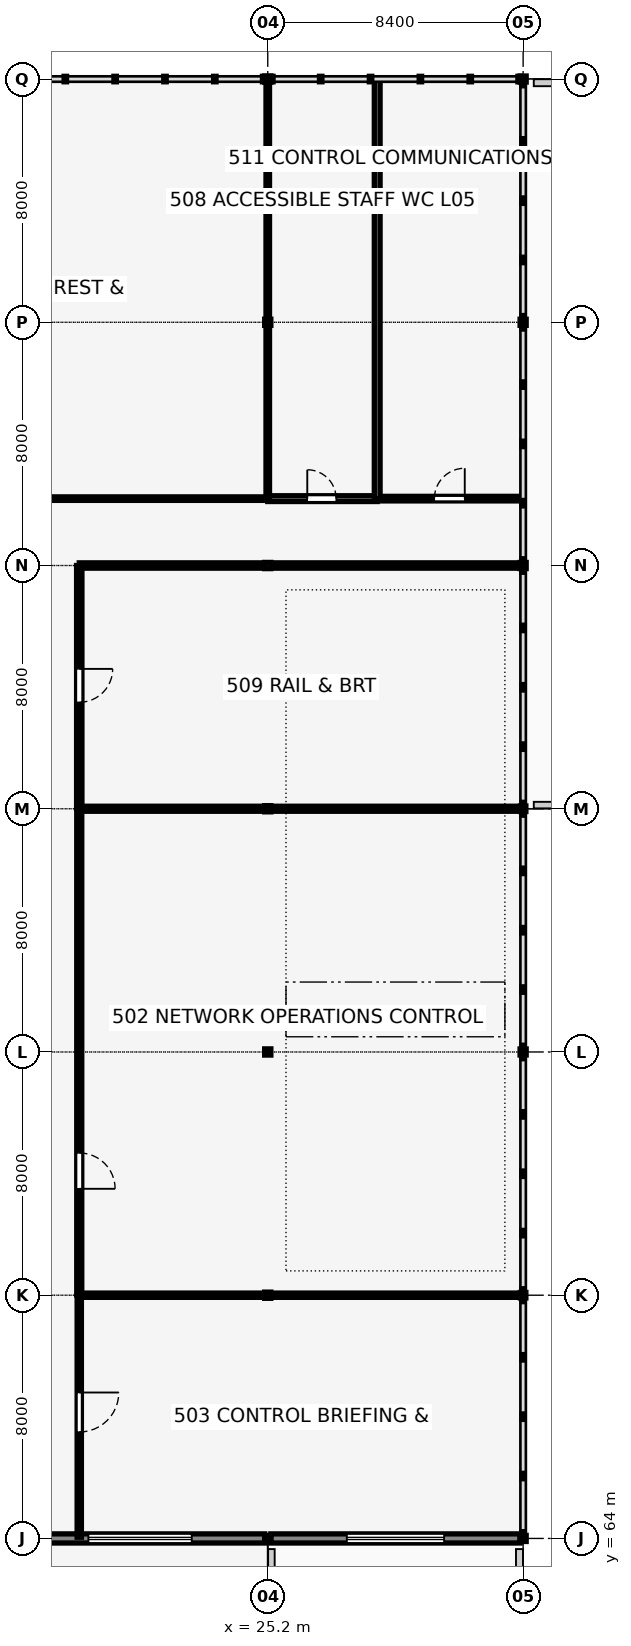
"""IFC4 building model, lengths in metres.
Left out: names, types, materials, properties, quantities, classifications, styles, units other than length and angle.
Written with IfcOpenShell. Run it as: python <this file> out.ifc"""

import sys

from ifc_helpers import new_model, si_unit, direction, frame, frame_2d, origin, origin_2d, place, context, subcontext, project, spatial, rectangle, hollow_rectangle, i_section, extrude, element, fill, save


model = new_model("IFC4")
c1 = context("Model", 3, precision=1e-05, world=origin(), true_north=direction((0.0, 1.0)))
c2 = subcontext(c1, "Body", "Model", "MODEL_VIEW")
j1 = project(units=[si_unit("LENGTHUNIT", "METRE"), si_unit("PLANEANGLEUNIT", "RADIAN")], contexts=[c1])
p1 = place(None, origin())
s1 = spatial("IfcSite", under=j1, at=p1, CompositionType="ELEMENT")
p2 = place(p1, origin())
s2 = spatial("IfcBuilding", under=s1, at=p2, CompositionType="ELEMENT")
p3 = place(p2, frame((0.0, 0.0, 21.04)))
s3 = spatial("IfcBuildingStorey", under=s2, at=p3, CompositionType="ELEMENT", Elevation=21.04)
for number, where, z_axis, x_axis in (
    (1, (25.2, 64.0, 0.0), (0.0, 0.0, 1.0), (1.0, 0.0, 0.0)),
    (2, (25.2, 72.0, 0.0), (0.0, 0.0, 1.0), (1.0, 0.0, 0.0)),
    (3, (25.2, 80.0, 0.0), (0.0, 0.0, 1.0), (1.0, 0.0, 0.0)),
    (4, (25.2, 88.0, 0.0), (0.0, 0.0, 1.0), (1.0, 0.0, 0.0)),
    (5, (25.2, 96.0, 0.0), (0.0, 0.0, 1.0), (1.0, 0.0, 0.0)),
    (6, (25.2, 104.0, 0.0), (0.0, 0.0, 1.0), (1.0, 0.0, 0.0)),
    (7, (25.2, 112.0, 0.0), (0.0, 0.0, 1.0), (1.0, 0.0, 0.0)),
):
    element("IfcColumn", number, at=place(p3, frame(where, z_axis=z_axis, x_axis=x_axis)), inside=s3, PredefinedType="COLUMN", context=c2, shape_type="SweptSolid", body=[
        extrude(i_section(OverallWidth=0.204, OverallDepth=0.203, WebThickness=0.007, FlangeThickness=0.011, FilletRadius=0.01, at=origin_2d()), origin(), (0.0, 0.0, 1.0), 4.82),
    ])
p4 = place(p3, frame((33.6, 64.0, 0.0), z_axis=(0.0, 0.0, 1.0), x_axis=(1.0, 0.0, 0.0)))
e8 = element("IfcColumn", 8, at=p4, inside=s3, PredefinedType="COLUMN", context=c2, shape_type="SweptSolid", body=[
    extrude(hollow_rectangle(XDim=0.2, YDim=0.2, WallThickness=0.01, InnerFilletRadius=0.015, OuterFilletRadius=0.025, at=origin_2d()), origin(), (0.0, 0.0, 1.0), 3.92),
])
p5 = place(p3, frame((33.6, 72.0, 0.0), z_axis=(0.0, 0.0, 1.0), x_axis=(1.0, 0.0, 0.0)))
e9 = element("IfcColumn", 9, at=p5, inside=s3, PredefinedType="COLUMN", context=c2, shape_type="SweptSolid", body=[
    extrude(hollow_rectangle(XDim=0.18, YDim=0.18, WallThickness=0.008, InnerFilletRadius=0.012, OuterFilletRadius=0.02, at=origin_2d()), origin(), (0.0, 0.0, 1.0), 3.92),
])
p6 = place(p3, frame((33.6, 80.0, 0.0), z_axis=(0.0, 0.0, 1.0), x_axis=(1.0, 0.0, 0.0)))
e10 = element("IfcColumn", 10, at=p6, inside=s3, PredefinedType="COLUMN", context=c2, shape_type="SweptSolid", body=[
    extrude(hollow_rectangle(XDim=0.2, YDim=0.2, WallThickness=0.01, InnerFilletRadius=0.015, OuterFilletRadius=0.025, at=origin_2d()), origin(), (0.0, 0.0, 1.0), 3.92),
])
p7 = place(p3, frame((33.6, 88.0, 0.0), z_axis=(0.0, 0.0, 1.0), x_axis=(1.0, 0.0, 0.0)))
e11 = element("IfcColumn", 11, at=p7, inside=s3, PredefinedType="COLUMN", context=c2, shape_type="SweptSolid", body=[
    extrude(hollow_rectangle(XDim=0.18, YDim=0.18, WallThickness=0.008, InnerFilletRadius=0.012, OuterFilletRadius=0.02, at=origin_2d()), origin(), (0.0, 0.0, 1.0), 3.92),
])
for number, where, z_axis, x_axis in (
    (12, (33.6, 96.0, 0.0), (0.0, 0.0, 1.0), (1.0, 0.0, 0.0)),
    (13, (33.6, 104.0, 0.0), (0.0, 0.0, 1.0), (1.0, 0.0, 0.0)),
    (14, (33.6, 112.0, 0.0), (0.0, 0.0, 1.0), (1.0, 0.0, 0.0)),
):
    element("IfcColumn", number, at=place(p3, frame(where, z_axis=z_axis, x_axis=x_axis)), inside=s3, PredefinedType="COLUMN", context=c2, shape_type="SweptSolid", body=[
        extrude(hollow_rectangle(XDim=0.2, YDim=0.2, WallThickness=0.01, InnerFilletRadius=0.015, OuterFilletRadius=0.025, at=origin_2d()), origin(), (0.0, 0.0, 1.0), 3.92),
    ])
p8 = place(p3, frame((16.902, 64.0, 0.0), z_axis=(0.0, 0.0, 1.0), x_axis=(1.0, 0.0, 0.0)))
e15 = element("IfcWall", 15, at=p8, inside=s3, PredefinedType="SOLIDWALL", context=c2, shape_type="SweptSolid", body=[
    extrude(rectangle(XDim=8.196, YDim=0.3, at=frame_2d((4.098, 0.0))), origin(), (0.0, 0.0, 1.0), 3.92),
])
p9 = place(p8, frame((2.398, 0.0, 0.9), z_axis=(0.0, 0.0, 1.0), x_axis=(1.0, 0.0, 0.0)))
e16 = element("IfcOpeningElement", 16, at=p9, cuts=e15, PredefinedType="OPENING", context=c2, shape_type="SweptSolid", body=[
    extrude(rectangle(XDim=3.4, YDim=1.7, at=frame_2d((1.7, 0.85))), frame((0.0, 0.16, 0.0), z_axis=(0.0, -1.0, 0.0), x_axis=(1.0, 0.0, 0.0)), (0.0, 0.0, 1.0), 0.32),
])
p10 = place(p3, frame((25.302, 64.0, 0.0), z_axis=(0.0, 0.0, 1.0), x_axis=(1.0, 0.0, 0.0)))
e17 = element("IfcWall", 17, at=p10, inside=s3, PredefinedType="SOLIDWALL", context=c2, shape_type="SweptSolid", body=[
    extrude(rectangle(XDim=8.198, YDim=0.3, at=frame_2d((4.099, 0.0))), origin(), (0.0, 0.0, 1.0), 3.92),
])
p11 = place(p10, frame((2.499, 0.0, 0.9), z_axis=(0.0, 0.0, 1.0), x_axis=(1.0, 0.0, 0.0)))
e18 = element("IfcOpeningElement", 18, at=p11, cuts=e17, PredefinedType="OPENING", context=c2, shape_type="SweptSolid", body=[
    extrude(rectangle(XDim=3.2, YDim=1.65, at=frame_2d((1.6, 0.825))), frame((0.0, 0.16, 0.0), z_axis=(0.0, -1.0, 0.0), x_axis=(1.0, 0.0, 0.0)), (0.0, 0.0, 1.0), 0.32),
])
p12 = place(p3, frame((25.32, 56.12, 0.0), z_axis=(0.0, 0.0, 1.0), x_axis=(0.0, 1.0, 0.0)))
e19 = element("IfcWall", 19, at=p12, inside=s3, PredefinedType="PARAPET", context=c2, shape_type="SweptSolid", body=[
    extrude(rectangle(XDim=7.53, YDim=0.215, at=frame_2d((3.765, 0.0))), origin(), (0.0, 0.0, 1.0), 1.05),
])
p13 = place(p3, frame((33.48, 63.65, 0.0), z_axis=(0.0, 0.0, 1.0), x_axis=(0.0, -1.0, 0.0)))
e20 = element("IfcWall", 20, at=p13, inside=s3, PredefinedType="PARAPET", context=c2, shape_type="SweptSolid", body=[
    extrude(rectangle(XDim=7.53, YDim=0.23, at=frame_2d((3.765, 0.0))), origin(), (0.0, 0.0, 1.0), 1.05),
])
p14 = place(p3, frame((50.28, 88.12, 0.0), z_axis=(0.0, 0.0, 1.0), x_axis=(-1.0, 0.0, 0.0)))
e21 = element("IfcWall", 21, at=p14, inside=s3, PredefinedType="PARAPET", context=c2, shape_type="SweptSolid", body=[
    extrude(rectangle(XDim=16.33, YDim=0.215, at=frame_2d((8.165, 0.0))), origin(), (0.0, 0.0, 1.0), 1.05),
])
p15 = place(p3, frame((33.95, 111.88, 0.0), z_axis=(0.0, 0.0, 1.0), x_axis=(1.0, 0.0, 0.0)))
e22 = element("IfcWall", 22, at=p15, inside=s3, PredefinedType="PARAPET", context=c2, shape_type="SweptSolid", body=[
    extrude(rectangle(XDim=16.33, YDim=0.23, at=frame_2d((8.165, 0.0))), origin(), (0.0, 0.0, 1.0), 1.05),
])
p16 = place(p3, frame((19.0, 64.04, 0.0), z_axis=(0.0, 0.0, 1.0), x_axis=(0.0, 1.0, 0.0)))
e23 = element("IfcWall", 23, at=p16, inside=s3, PredefinedType="PARTITIONING", context=c2, shape_type="SweptSolid", body=[
    extrude(rectangle(XDim=7.96, YDim=0.14, at=frame_2d((3.98, 0.0))), origin(), (0.0, 0.0, 1.0), 3.92),
])
p17 = place(p16, frame((4.76, 0.0, 0.0), z_axis=(0.0, 0.0, 1.0), x_axis=(-1.0, 0.0, 0.0)))
e24 = element("IfcOpeningElement", 24, at=p17, cuts=e23, PredefinedType="OPENING", context=c2, shape_type="SweptSolid", body=[
    extrude(rectangle(XDim=1.3, YDim=2.25, at=frame_2d((0.65, 1.125))), frame((0.0, 0.08, 0.0), z_axis=(0.0, -1.0, 0.0), x_axis=(1.0, 0.0, 0.0)), (0.0, 0.0, 1.0), 0.16),
])
p18 = place(p3, frame((19.0, 72.0, 0.0), z_axis=(0.0, 0.0, 1.0), x_axis=(0.0, 1.0, 0.0)))
e25 = element("IfcWall", 25, at=p18, inside=s3, PredefinedType="PARTITIONING", context=c2, shape_type="SweptSolid", body=[
    extrude(rectangle(XDim=16.0, YDim=0.165, at=frame_2d((8.0, 0.0))), origin(), (0.0, 0.0, 1.0), 3.92),
])
p19 = place(p18, frame((4.68, 0.0, 0.0), z_axis=(0.0, 0.0, 1.0), x_axis=(-1.0, 0.0, 0.0)))
e26 = element("IfcOpeningElement", 26, at=p19, cuts=e25, PredefinedType="OPENING", context=c2, shape_type="SweptSolid", body=[
    extrude(rectangle(XDim=1.18, YDim=2.22, at=frame_2d((0.59, 1.11))), frame((0.0, 0.093, 0.0), z_axis=(0.0, -1.0, 0.0), x_axis=(1.0, 0.0, 0.0)), (0.0, 0.0, 1.0), 0.185),
])
p20 = place(p3, frame((19.0, 88.0, 0.0), z_axis=(0.0, 0.0, 1.0), x_axis=(0.0, 1.0, 0.0)))
e27 = element("IfcWall", 27, at=p20, inside=s3, PredefinedType="PARTITIONING", context=c2, shape_type="SweptSolid", body=[
    extrude(rectangle(XDim=8.0, YDim=0.175, at=frame_2d((4.0, 0.0))), origin(), (0.0, 0.0, 1.0), 3.92),
])
p21 = place(p20, frame((4.6, 0.0, 0.0), z_axis=(0.0, 0.0, 1.0), x_axis=(-1.0, 0.0, 0.0)))
e28 = element("IfcOpeningElement", 28, at=p21, cuts=e27, PredefinedType="OPENING", context=c2, shape_type="SweptSolid", body=[
    extrude(rectangle(XDim=1.1, YDim=2.2, at=frame_2d((0.55, 1.1))), frame((0.0, 0.097, 0.0), z_axis=(0.0, -1.0, 0.0), x_axis=(1.0, 0.0, 0.0)), (0.0, 0.0, 1.0), 0.195),
])
p22 = place(p3, frame((8.4, 98.2, 0.0), z_axis=(0.0, 0.0, 1.0), x_axis=(1.0, 0.0, 0.0)))
e29 = element("IfcWall", 29, at=p22, inside=s3, PredefinedType="PARTITIONING", context=c2, shape_type="SweptSolid", body=[
    extrude(rectangle(XDim=16.8, YDim=0.115, at=frame_2d((8.4, 0.0))), origin(), (0.0, 0.0, 1.0), 3.92),
])
p23 = place(p22, frame((3.7, 0.0, 0.0), z_axis=(0.0, 0.0, 1.0), x_axis=(1.0, 0.0, 0.0)))
e30 = element("IfcOpeningElement", 30, at=p23, cuts=e29, PredefinedType="OPENING", context=c2, shape_type="SweptSolid", body=[
    extrude(rectangle(XDim=0.98, YDim=2.15, at=frame_2d((0.49, 1.075))), frame((0.0, 0.067, 0.0), z_axis=(0.0, -1.0, 0.0), x_axis=(1.0, 0.0, 0.0)), (0.0, 0.0, 1.0), 0.135),
])
p24 = place(p3, frame((25.2, 98.2, 0.0), z_axis=(0.0, 0.0, 1.0), x_axis=(1.0, 0.0, 0.0)))
e31 = element("IfcWall", 31, at=p24, inside=s3, PredefinedType="PLUMBINGWALL", context=c2, shape_type="SweptSolid", body=[
    extrude(rectangle(XDim=3.6, YDim=0.19, at=frame_2d((1.8, 0.0))), origin(), (0.0, 0.0, 1.0), 3.92),
])
p25 = place(p24, frame((1.3, 0.0, 0.0), z_axis=(0.0, 0.0, 1.0), x_axis=(1.0, 0.0, 0.0)))
e32 = element("IfcOpeningElement", 32, at=p25, cuts=e31, PredefinedType="OPENING", context=c2, shape_type="SweptSolid", body=[
    extrude(rectangle(XDim=0.95, YDim=2.15, at=frame_2d((0.475, 1.075))), frame((0.0, 0.105, 0.0), z_axis=(0.0, -1.0, 0.0), x_axis=(1.0, 0.0, 0.0)), (0.0, 0.0, 1.0), 0.21),
])
p26 = place(p3, frame((28.8, 98.2, 0.0), z_axis=(0.0, 0.0, 1.0), x_axis=(1.0, 0.0, 0.0)))
e33 = element("IfcWall", 33, at=p26, inside=s3, PredefinedType="PARTITIONING", context=c2, shape_type="SweptSolid", body=[
    extrude(rectangle(XDim=4.76, YDim=0.15, at=frame_2d((2.38, 0.0))), origin(), (0.0, 0.0, 1.0), 3.92),
])
p27 = place(p26, frame((1.88, 0.0, 0.0), z_axis=(0.0, 0.0, 1.0), x_axis=(1.0, 0.0, 0.0)))
e34 = element("IfcOpeningElement", 34, at=p27, cuts=e33, PredefinedType="OPENING", context=c2, shape_type="SweptSolid", body=[
    extrude(rectangle(XDim=1.0, YDim=2.15, at=frame_2d((0.5, 1.075))), frame((0.0, 0.085, 0.0), z_axis=(0.0, -1.0, 0.0), x_axis=(1.0, 0.0, 0.0)), (0.0, 0.0, 1.0), 0.17),
])
p28 = place(p3, frame((19.0, 72.0, 0.0), z_axis=(0.0, 0.0, 1.0), x_axis=(1.0, 0.0, 0.0)))
e35 = element("IfcWall", 35, at=p28, inside=s3, PredefinedType="PARTITIONING", context=c2, shape_type="SweptSolid", body=[
    extrude(rectangle(XDim=6.108, YDim=0.14, at=frame_2d((3.054, 0.0))), origin(), (0.0, 0.0, 1.0), 3.92),
])
p29 = place(p3, frame((25.292, 72.0, 0.0), z_axis=(0.0, 0.0, 1.0), x_axis=(1.0, 0.0, 0.0)))
e36 = element("IfcWall", 36, at=p29, inside=s3, PredefinedType="PARTITIONING", context=c2, shape_type="SweptSolid", body=[
    extrude(rectangle(XDim=8.228, YDim=0.14, at=frame_2d((4.114, 0.0))), origin(), (0.0, 0.0, 1.0), 3.92),
])
p30 = place(p3, frame((19.0, 88.0, 0.0), z_axis=(0.0, 0.0, 1.0), x_axis=(1.0, 0.0, 0.0)))
e37 = element("IfcWall", 37, at=p30, inside=s3, PredefinedType="PARTITIONING", context=c2, shape_type="SweptSolid", body=[
    extrude(rectangle(XDim=6.108, YDim=0.165, at=frame_2d((3.054, 0.0))), origin(), (0.0, 0.0, 1.0), 3.92),
])
p31 = place(p3, frame((25.292, 88.0, 0.0), z_axis=(0.0, 0.0, 1.0), x_axis=(1.0, 0.0, 0.0)))
e38 = element("IfcWall", 38, at=p31, inside=s3, PredefinedType="PARTITIONING", context=c2, shape_type="SweptSolid", body=[
    extrude(rectangle(XDim=8.228, YDim=0.165, at=frame_2d((4.114, 0.0))), origin(), (0.0, 0.0, 1.0), 3.92),
])
p32 = place(p3, frame((19.0, 96.0, 0.0), z_axis=(0.0, 0.0, 1.0), x_axis=(1.0, 0.0, 0.0)))
e39 = element("IfcWall", 39, at=p32, inside=s3, PredefinedType="PARTITIONING", context=c2, shape_type="SweptSolid", body=[
    extrude(rectangle(XDim=6.108, YDim=0.175, at=frame_2d((3.054, 0.0))), origin(), (0.0, 0.0, 1.0), 3.92),
])
p33 = place(p3, frame((25.292, 96.0, 0.0), z_axis=(0.0, 0.0, 1.0), x_axis=(1.0, 0.0, 0.0)))
e40 = element("IfcWall", 40, at=p33, inside=s3, PredefinedType="PARTITIONING", context=c2, shape_type="SweptSolid", body=[
    extrude(rectangle(XDim=8.218, YDim=0.175, at=frame_2d((4.109, 0.0))), origin(), (0.0, 0.0, 1.0), 3.92),
])
p34 = place(p3, frame((25.2, 98.2, 0.0), z_axis=(0.0, 0.0, 1.0), x_axis=(0.0, 1.0, 0.0)))
e41 = element("IfcWall", 41, at=p34, inside=s3, PredefinedType="PARTITIONING", context=c2, shape_type="SweptSolid", body=[
    extrude(rectangle(XDim=5.708, YDim=0.115, at=frame_2d((2.854, 0.0))), origin(), (0.0, 0.0, 1.0), 3.92),
])
p35 = place(p3, frame((25.2, 104.092, 0.0), z_axis=(0.0, 0.0, 1.0), x_axis=(0.0, 1.0, 0.0)))
e42 = element("IfcWall", 42, at=p35, inside=s3, PredefinedType="PARTITIONING", context=c2, shape_type="SweptSolid", body=[
    extrude(rectangle(XDim=7.817, YDim=0.115, at=frame_2d((3.908, 0.0))), origin(), (0.0, 0.0, 1.0), 3.92),
])
p36 = place(p3, frame((28.8, 98.2, 0.0), z_axis=(0.0, 0.0, 1.0), x_axis=(0.0, 1.0, 0.0)))
e43 = element("IfcWall", 43, at=p36, inside=s3, PredefinedType="PLUMBINGWALL", context=c2, shape_type="SweptSolid", body=[
    extrude(rectangle(XDim=13.76, YDim=0.19, at=frame_2d((6.88, 0.0))), origin(), (0.0, 0.0, 1.0), 3.92),
])
p37 = place(p9, origin())
e44 = element("IfcWindow", 44, at=p37, inside=s3, PartitioningType="TRIPLE_PANEL_VERTICAL", PredefinedType="WINDOW", context=c2, shape_type="SweptSolid", body=[
    extrude(rectangle(XDim=3.4, YDim=1.7, at=frame_2d((1.7, 0.85))), frame((0.0, 0.03, 0.0), z_axis=(0.0, -1.0, 0.0), x_axis=(1.0, 0.0, 0.0)), (0.0, 0.0, 1.0), 0.06),
])
fill(e16, e44)
p38 = place(p11, origin())
e45 = element("IfcWindow", 45, at=p38, inside=s3, PartitioningType="TRIPLE_PANEL_VERTICAL", PredefinedType="WINDOW", context=c2, shape_type="SweptSolid", body=[
    extrude(rectangle(XDim=3.2, YDim=1.65, at=frame_2d((1.6, 0.825))), frame((0.0, 0.03, 0.0), z_axis=(0.0, -1.0, 0.0), x_axis=(1.0, 0.0, 0.0)), (0.0, 0.0, 1.0), 0.06),
])
fill(e18, e45)
p39 = place(p17, origin())
e46 = element("IfcDoor", 46, at=p39, inside=s3, OperationType="SINGLE_SWING_LEFT", PredefinedType="DOOR", context=c2, shape_type="SweptSolid", body=[
    extrude(rectangle(XDim=1.3, YDim=2.25, at=frame_2d((0.65, 1.125))), frame((0.0, 0.025, 0.0), z_axis=(0.0, -1.0, 0.0), x_axis=(1.0, 0.0, 0.0)), (0.0, 0.0, 1.0), 0.05),
])
fill(e24, e46)
p40 = place(p19, origin())
e47 = element("IfcDoor", 47, at=p40, inside=s3, OperationType="SINGLE_SWING_RIGHT", PredefinedType="DOOR", context=c2, shape_type="SweptSolid", body=[
    extrude(rectangle(XDim=1.18, YDim=2.22, at=frame_2d((0.59, 1.11))), frame((0.0, 0.025, 0.0), z_axis=(0.0, -1.0, 0.0), x_axis=(1.0, 0.0, 0.0)), (0.0, 0.0, 1.0), 0.05),
])
fill(e26, e47)
p41 = place(p21, origin())
e48 = element("IfcDoor", 48, at=p41, inside=s3, OperationType="SINGLE_SWING_LEFT", PredefinedType="DOOR", context=c2, shape_type="SweptSolid", body=[
    extrude(rectangle(XDim=1.1, YDim=2.2, at=frame_2d((0.55, 1.1))), frame((0.0, 0.025, 0.0), z_axis=(0.0, -1.0, 0.0), x_axis=(1.0, 0.0, 0.0)), (0.0, 0.0, 1.0), 0.05),
])
fill(e28, e48)
p42 = place(p25, origin())
e49 = element("IfcDoor", 49, at=p42, inside=s3, OperationType="SINGLE_SWING_LEFT", PredefinedType="DOOR", context=c2, shape_type="SweptSolid", body=[
    extrude(rectangle(XDim=0.95, YDim=2.15, at=frame_2d((0.475, 1.075))), frame((0.0, 0.025, 0.0), z_axis=(0.0, -1.0, 0.0), x_axis=(1.0, 0.0, 0.0)), (0.0, 0.0, 1.0), 0.05),
])
fill(e32, e49)
p43 = place(p27, origin())
e50 = element("IfcDoor", 50, at=p43, inside=s3, OperationType="SINGLE_SWING_RIGHT", PredefinedType="DOOR", context=c2, shape_type="SweptSolid", body=[
    extrude(rectangle(XDim=1.0, YDim=2.15, at=frame_2d((0.5, 1.075))), frame((0.0, 0.025, 0.0), z_axis=(0.0, -1.0, 0.0), x_axis=(1.0, 0.0, 0.0)), (0.0, 0.0, 1.0), 0.05),
])
fill(e34, e50)
save(model, sys.argv[1])
